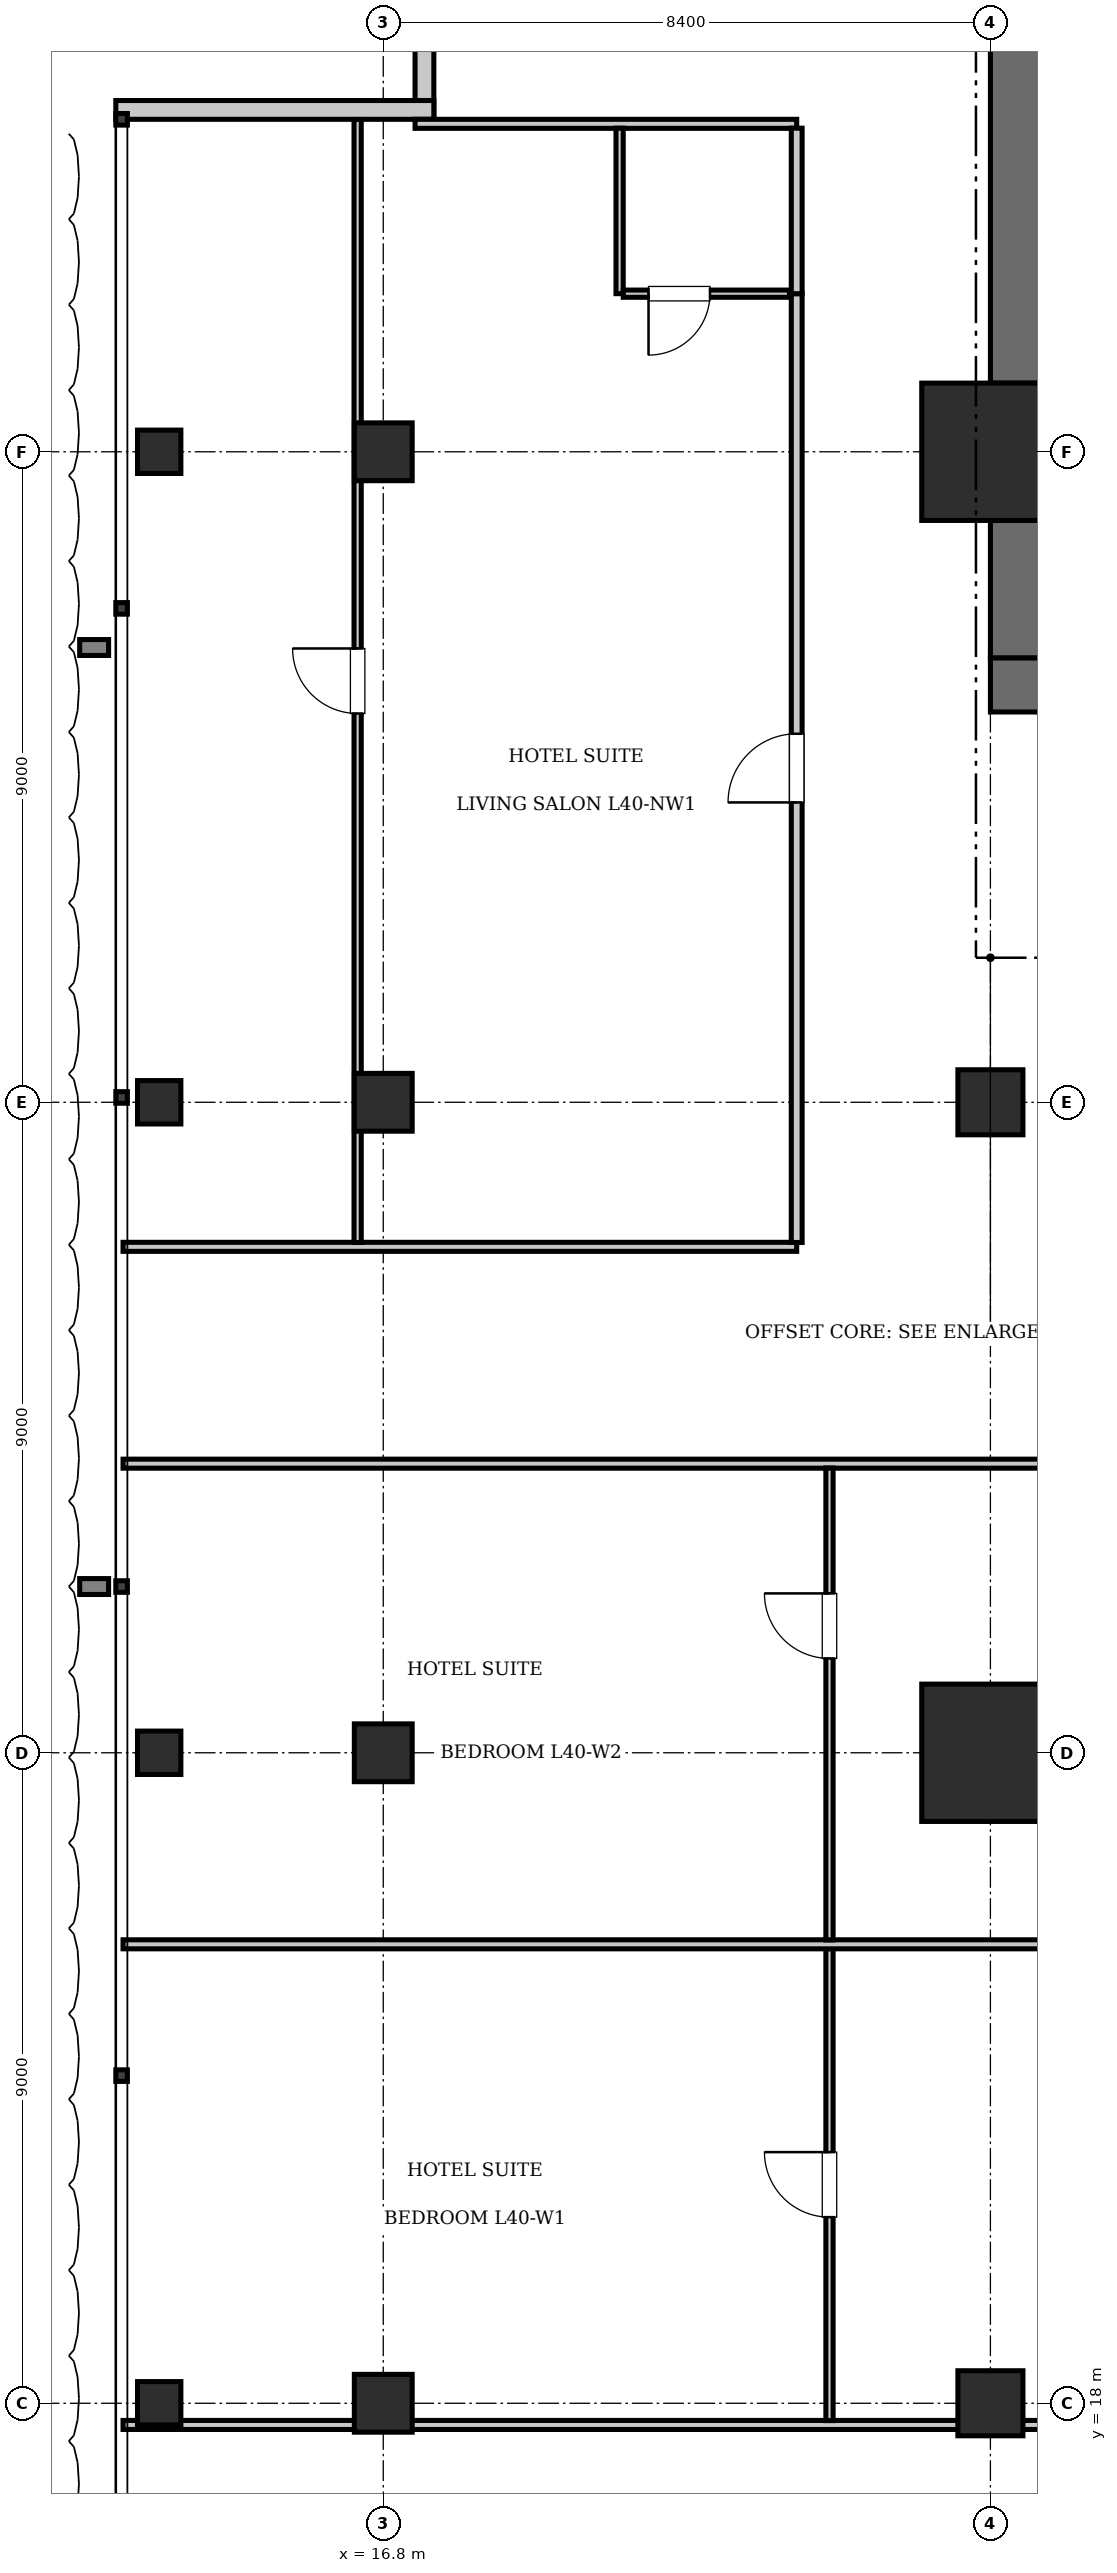
"""IFC4 building model, lengths in metres.
Left out: names, types, materials, properties, quantities, classifications, styles, units other than length and angle.
Written with IfcOpenShell. Run it as: python <this file> out.ifc"""

import sys

from ifc_helpers import new_model, si_unit, direction, frame, frame_2d, origin, origin_2d, place, context, subcontext, project, spatial, rectangle, i_section, extrude, element, fill, save


model = new_model("IFC4")
c1 = context("Model", 3, precision=1e-05, world=origin(), true_north=direction((0.0, 1.0)))
c2 = subcontext(c1, "Body", "Model", "MODEL_VIEW")
j1 = project(units=[si_unit("LENGTHUNIT", "METRE"), si_unit("PLANEANGLEUNIT", "RADIAN")], contexts=[c1])
p1 = place(None, origin())
s1 = spatial("IfcSite", under=j1, at=p1, CompositionType="ELEMENT")
p2 = place(p1, origin())
s2 = spatial("IfcBuilding", under=s1, at=p2, CompositionType="ELEMENT")
p3 = place(p2, frame((0.0, 0.0, 165.9)))
s3 = spatial("IfcBuildingStorey", under=s2, at=p3, CompositionType="ELEMENT", Elevation=165.9)
for number, where, z_axis, x_axis in (
    (1, (25.2, 27.0, 0.0), (0.0, 0.0, 1.0), (1.0, 0.0, 0.0)),
    (2, (25.2, 45.0, 0.0), (0.0, 0.0, 1.0), (1.0, 0.0, 0.0)),
):
    element("IfcColumn", number, at=place(p3, frame(where, z_axis=z_axis, x_axis=x_axis)), inside=s3, PredefinedType="COLUMN", context=c2, shape_type="SweptSolid", body=[
        extrude(rectangle(XDim=1.9, YDim=1.9, at=origin_2d()), origin(), (0.0, 0.0, 1.0), 3.85),
    ])
p4 = place(p3, frame((25.2, 41.775, 0.0), z_axis=(0.0, 0.0, 1.0), x_axis=(1.0, 0.0, 0.0)))
e3 = element("IfcWall", 3, at=p4, inside=s3, PredefinedType="SHEAR", context=c2, shape_type="SweptSolid", body=[
    extrude(rectangle(XDim=6.8, YDim=0.75, at=frame_2d((3.4, 0.0))), origin(), (0.0, 0.0, 1.0), 3.85),
])
p5 = place(p4, frame((1.65, 0.0, 0.0)))
e4 = element("IfcOpeningElement", 4, at=p5, cuts=e3, PredefinedType="OPENING", context=c2, shape_type="SweptSolid", body=[
    extrude(rectangle(XDim=1.15, YDim=2.15, at=frame_2d((0.575, 1.075))), frame((0.0, 0.385, 0.0), z_axis=(0.0, -1.0, 0.0), x_axis=(1.0, 0.0, 0.0)), (0.0, 0.0, 1.0), 0.77),
])
p6 = place(p4, frame((5.15, 0.0, 0.0)))
e5 = element("IfcOpeningElement", 5, at=p6, cuts=e3, PredefinedType="OPENING", context=c2, shape_type="SweptSolid", body=[
    extrude(rectangle(XDim=1.1, YDim=2.2, at=frame_2d((0.55, 1.1))), frame((0.0, 0.385, 0.0), z_axis=(0.0, -1.0, 0.0), x_axis=(1.0, 0.0, 0.0)), (0.0, 0.0, 1.0), 0.77),
])
p7 = place(p3, frame((25.575, 42.15, 0.0), z_axis=(0.0, 0.0, 1.0), x_axis=(0.0, 1.0, 0.0)))
e6 = element("IfcWall", 6, at=p7, inside=s3, PredefinedType="SHEAR", context=c2, shape_type="SweptSolid", body=[
    extrude(rectangle(XDim=1.9, YDim=0.75, at=frame_2d((0.95, 0.0))), origin(), (0.0, 0.0, 1.0), 3.85),
])
p8 = place(p3, frame((25.575, 45.95, 0.0), z_axis=(0.0, 0.0, 1.0), x_axis=(0.0, 1.0, 0.0)))
e7 = element("IfcWall", 7, at=p8, inside=s3, PredefinedType="SHEAR", context=c2, shape_type="SweptSolid", body=[
    extrude(rectangle(XDim=7.3, YDim=0.75, at=frame_2d((3.65, 0.0))), origin(), (0.0, 0.0, 1.0), 3.85),
])
for number, where, z_axis, x_axis in (
    (8, (25.2, 36.0, 0.0), (0.0, 0.0, 1.0), (1.0, 0.0, 0.0)),
    (9, (25.2, 18.0, 0.0), (0.0, 0.0, 1.0), (1.0, 0.0, 0.0)),
):
    element("IfcColumn", number, at=place(p3, frame(where, z_axis=z_axis, x_axis=x_axis)), inside=s3, PredefinedType="COLUMN", context=c2, shape_type="SweptSolid", body=[
        extrude(rectangle(XDim=0.9, YDim=0.9, at=origin_2d()), origin(), (0.0, 0.0, 1.0), 3.85),
    ])
for number, where, z_axis, x_axis in (
    (10, (16.8, 18.0, 0.0), (0.0, 0.0, 1.0), (1.0, 0.0, 0.0)),
    (11, (16.8, 27.0, 0.0), (0.0, 0.0, 1.0), (1.0, 0.0, 0.0)),
    (12, (16.8, 36.0, 0.0), (0.0, 0.0, 1.0), (1.0, 0.0, 0.0)),
    (13, (16.8, 45.0, 0.0), (0.0, 0.0, 1.0), (1.0, 0.0, 0.0)),
):
    element("IfcColumn", number, at=place(p3, frame(where, z_axis=z_axis, x_axis=x_axis)), inside=s3, PredefinedType="COLUMN", context=c2, shape_type="SweptSolid", body=[
        extrude(rectangle(XDim=0.8, YDim=0.8, at=origin_2d()), origin(), (0.0, 0.0, 1.0), 3.85),
    ])
for number, where, z_axis, x_axis in (
    (14, (13.7, 18.0, 0.0), (0.0, 0.0, 1.0), (1.0, 0.0, 0.0)),
    (15, (13.7, 27.0, 0.0), (0.0, 0.0, 1.0), (1.0, 0.0, 0.0)),
    (16, (13.7, 36.0, 0.0), (0.0, 0.0, 1.0), (1.0, 0.0, 0.0)),
    (17, (13.7, 45.0, 0.0), (0.0, 0.0, 1.0), (1.0, 0.0, 0.0)),
):
    element("IfcColumn", number, at=place(p3, frame(where, z_axis=z_axis, x_axis=x_axis)), inside=s3, PredefinedType="COLUMN", context=c2, shape_type="SweptSolid", body=[
        extrude(i_section(OverallWidth=0.6, OverallDepth=0.6, WebThickness=0.025, FlangeThickness=0.038, at=origin_2d()), origin(), (0.0, 0.0, 1.0), 3.85),
    ])
for number, where, z_axis, x_axis in (
    (18, (17.37, 49.6, 0.0), (0.0, 0.0, 1.0), (0.0, 1.0, 0.0)),
    (19, (13.1, 49.73, 0.0), (0.0, 0.0, 1.0), (1.0, 0.0, 0.0)),
):
    element("IfcWall", number, at=place(p3, frame(where, z_axis=z_axis, x_axis=x_axis)), inside=s3, PredefinedType="SOLIDWALL", context=c2, shape_type="SweptSolid", body=[
        extrude(rectangle(XDim=4.4, YDim=0.26, at=frame_2d((2.2, 0.0))), origin(), (0.0, 0.0, 1.0), 3.61),
    ])
for number, where, z_axis, x_axis in (
    (20, (13.2, 17.7, 0.0), (0.0, 0.0, 1.0), (1.0, 0.0, 0.0)),
    (21, (13.2, 31.0, 0.0), (0.0, 0.0, 1.0), (1.0, 0.0, 0.0)),
):
    element("IfcWall", number, at=place(p3, frame(where, z_axis=z_axis, x_axis=x_axis)), inside=s3, PredefinedType="PARTITIONING", context=c2, shape_type="SweptSolid", body=[
        extrude(rectangle(XDim=22.92, YDim=0.125, at=frame_2d((11.46, 0.0))), origin(), (0.0, 0.0, 1.0), 3.61),
    ])
p9 = place(p3, frame((22.974, 17.76, 0.0), z_axis=(0.0, 0.0, 1.0), x_axis=(0.0, 1.0, 0.0)))
e22 = element("IfcWall", 22, at=p9, inside=s3, PredefinedType="PARTITIONING", context=c2, shape_type="SweptSolid", body=[
    extrude(rectangle(XDim=6.53, YDim=0.1, at=frame_2d((3.265, 0.0))), origin(), (0.0, 0.0, 1.0), 3.61),
])
p10 = place(p9, frame((2.815, 0.0, 0.0)))
e23 = element("IfcOpeningElement", 23, at=p10, cuts=e22, PredefinedType="OPENING", context=c2, shape_type="SweptSolid", body=[
    extrude(rectangle(XDim=0.9, YDim=2.1, at=frame_2d((0.45, 1.05))), frame((0.0, 0.06, 0.0), z_axis=(0.0, -1.0, 0.0), x_axis=(1.0, 0.0, 0.0)), (0.0, 0.0, 1.0), 0.12),
])
p11 = place(p3, frame((13.2, 24.35, 0.0), z_axis=(0.0, 0.0, 1.0), x_axis=(1.0, 0.0, 0.0)))
e24 = element("IfcWall", 24, at=p11, inside=s3, PredefinedType="PARTITIONING", context=c2, shape_type="SweptSolid", body=[
    extrude(rectangle(XDim=22.92, YDim=0.125, at=frame_2d((11.46, 0.0))), origin(), (0.0, 0.0, 1.0), 3.61),
])
p12 = place(p3, frame((22.974, 24.41, 0.0), z_axis=(0.0, 0.0, 1.0), x_axis=(0.0, 1.0, 0.0)))
e25 = element("IfcWall", 25, at=p12, inside=s3, PredefinedType="PARTITIONING", context=c2, shape_type="SweptSolid", body=[
    extrude(rectangle(XDim=6.53, YDim=0.1, at=frame_2d((3.265, 0.0))), origin(), (0.0, 0.0, 1.0), 3.61),
])
p13 = place(p12, frame((3.895, 0.0, 0.0)))
e26 = element("IfcOpeningElement", 26, at=p13, cuts=e25, PredefinedType="OPENING", context=c2, shape_type="SweptSolid", body=[
    extrude(rectangle(XDim=0.9, YDim=2.1, at=frame_2d((0.45, 1.05))), frame((0.0, 0.06, 0.0), z_axis=(0.0, -1.0, 0.0), x_axis=(1.0, 0.0, 0.0)), (0.0, 0.0, 1.0), 0.12),
])
p14 = place(p3, frame((13.2, 34.0, 0.0), z_axis=(0.0, 0.0, 1.0), x_axis=(1.0, 0.0, 0.0)))
e27 = element("IfcWall", 27, at=p14, inside=s3, PredefinedType="PARTITIONING", context=c2, shape_type="SweptSolid", body=[
    extrude(rectangle(XDim=9.32, YDim=0.125, at=frame_2d((4.66, 0.0))), origin(), (0.0, 0.0, 1.0), 3.61),
])
p15 = place(p3, frame((17.24, 49.538, 0.0), z_axis=(0.0, 0.0, 1.0), x_axis=(1.0, 0.0, 0.0)))
e28 = element("IfcWall", 28, at=p15, inside=s3, PredefinedType="PARTITIONING", context=c2, shape_type="SweptSolid", body=[
    extrude(rectangle(XDim=5.28, YDim=0.125, at=frame_2d((2.64, 0.0))), origin(), (0.0, 0.0, 1.0), 3.61),
])
p16 = place(p3, frame((22.52, 34.06, 0.0), z_axis=(0.0, 0.0, 1.0), x_axis=(0.0, 1.0, 0.0)))
e29 = element("IfcWall", 29, at=p16, inside=s3, PredefinedType="PARTITIONING", context=c2, shape_type="SweptSolid", body=[
    extrude(rectangle(XDim=13.127, YDim=0.15, at=frame_2d((6.564, 0.0))), origin(), (0.0, 0.0, 1.0), 3.61),
])
p17 = place(p16, frame((6.089, 0.0, 0.0)))
e30 = element("IfcOpeningElement", 30, at=p17, cuts=e29, PredefinedType="OPENING", context=c2, shape_type="SweptSolid", body=[
    extrude(rectangle(XDim=0.95, YDim=2.15, at=frame_2d((0.475, 1.075))), frame((0.0, 0.085, 0.0), z_axis=(0.0, -1.0, 0.0), x_axis=(1.0, 0.0, 0.0)), (0.0, 0.0, 1.0), 0.17),
])
p18 = place(p3, frame((22.52, 47.188, 0.0), z_axis=(0.0, 0.0, 1.0), x_axis=(0.0, 1.0, 0.0)))
e31 = element("IfcWall", 31, at=p18, inside=s3, PredefinedType="PARTITIONING", context=c2, shape_type="SweptSolid", body=[
    extrude(rectangle(XDim=2.29, YDim=0.15, at=frame_2d((1.145, 0.0))), origin(), (0.0, 0.0, 1.0), 3.61),
])
p19 = place(p3, frame((20.07, 47.188, 0.0), z_axis=(0.0, 0.0, 1.0), x_axis=(0.0, 1.0, 0.0)))
e32 = element("IfcWall", 32, at=p19, inside=s3, PredefinedType="PARTITIONING", context=c2, shape_type="SweptSolid", body=[
    extrude(rectangle(XDim=2.29, YDim=0.1, at=frame_2d((1.145, 0.0))), origin(), (0.0, 0.0, 1.0), 3.61),
])
p20 = place(p3, frame((20.12, 47.188, 0.0), z_axis=(0.0, 0.0, 1.0), x_axis=(1.0, 0.0, 0.0)))
e33 = element("IfcWall", 33, at=p20, inside=s3, PredefinedType="PARTITIONING", context=c2, shape_type="SweptSolid", body=[
    extrude(rectangle(XDim=2.3, YDim=0.1, at=frame_2d((1.15, 0.0))), origin(), (0.0, 0.0, 1.0), 3.61),
])
p21 = place(p20, frame((0.35, 0.0, 0.0)))
e34 = element("IfcOpeningElement", 34, at=p21, cuts=e33, PredefinedType="OPENING", context=c2, shape_type="SweptSolid", body=[
    extrude(rectangle(XDim=0.85, YDim=2.1, at=frame_2d((0.425, 1.05))), frame((0.0, 0.06, 0.0), z_axis=(0.0, -1.0, 0.0), x_axis=(1.0, 0.0, 0.0)), (0.0, 0.0, 1.0), 0.12),
])
p22 = place(p3, frame((16.446, 34.06, 0.0), z_axis=(0.0, 0.0, 1.0), x_axis=(0.0, 1.0, 0.0)))
e35 = element("IfcWall", 35, at=p22, inside=s3, PredefinedType="PARTITIONING", context=c2, shape_type="SweptSolid", body=[
    extrude(rectangle(XDim=15.537, YDim=0.1, at=frame_2d((7.769, 0.0))), origin(), (0.0, 0.0, 1.0), 3.61),
])
p23 = place(p22, frame((7.319, 0.0, 0.0)))
e36 = element("IfcOpeningElement", 36, at=p23, cuts=e35, PredefinedType="OPENING", context=c2, shape_type="SweptSolid", body=[
    extrude(rectangle(XDim=0.9, YDim=2.1, at=frame_2d((0.45, 1.05))), frame((0.0, 0.06, 0.0), z_axis=(0.0, -1.0, 0.0), x_axis=(1.0, 0.0, 0.0)), (0.0, 0.0, 1.0), 0.12),
])
p24 = place(p10, origin())
e37 = element("IfcDoor", 37, at=p24, inside=s3, OperationType="SINGLE_SWING_RIGHT", PredefinedType="DOOR", context=c2, shape_type="SweptSolid", body=[
    extrude(rectangle(XDim=0.9, YDim=2.1, at=frame_2d((0.45, 1.05))), frame((0.0, 0.025, 0.0), z_axis=(0.0, -1.0, 0.0), x_axis=(1.0, 0.0, 0.0)), (0.0, 0.0, 1.0), 0.05),
])
fill(e23, e37)
p25 = place(p13, origin())
e38 = element("IfcDoor", 38, at=p25, inside=s3, OperationType="SINGLE_SWING_RIGHT", PredefinedType="DOOR", context=c2, shape_type="SweptSolid", body=[
    extrude(rectangle(XDim=0.9, YDim=2.1, at=frame_2d((0.45, 1.05))), frame((0.0, 0.025, 0.0), z_axis=(0.0, -1.0, 0.0), x_axis=(1.0, 0.0, 0.0)), (0.0, 0.0, 1.0), 0.05),
])
fill(e26, e38)
p26 = place(p21, frame((0.85, 0.0, 0.0), z_axis=(0.0, 0.0, 1.0), x_axis=(-1.0, 0.0, 0.0)))
e39 = element("IfcDoor", 39, at=p26, inside=s3, OperationType="SINGLE_SWING_RIGHT", PredefinedType="DOOR", context=c2, shape_type="SweptSolid", body=[
    extrude(rectangle(XDim=0.85, YDim=2.1, at=frame_2d((0.425, 1.05))), frame((0.0, 0.025, 0.0), z_axis=(0.0, -1.0, 0.0), x_axis=(1.0, 0.0, 0.0)), (0.0, 0.0, 1.0), 0.05),
])
fill(e34, e39)
p27 = place(p17, origin())
e40 = element("IfcDoor", 40, at=p27, inside=s3, OperationType="SINGLE_SWING_LEFT", PredefinedType="DOOR", context=c2, shape_type="SweptSolid", body=[
    extrude(rectangle(XDim=0.95, YDim=2.15, at=frame_2d((0.475, 1.075))), frame((0.0, 0.025, 0.0), z_axis=(0.0, -1.0, 0.0), x_axis=(1.0, 0.0, 0.0)), (0.0, 0.0, 1.0), 0.05),
])
fill(e30, e40)
p28 = place(p23, origin())
e41 = element("IfcDoor", 41, at=p28, inside=s3, OperationType="SINGLE_SWING_RIGHT", PredefinedType="DOOR", context=c2, shape_type="SweptSolid", body=[
    extrude(rectangle(XDim=0.9, YDim=2.1, at=frame_2d((0.45, 1.05))), frame((0.0, 0.025, 0.0), z_axis=(0.0, -1.0, 0.0), x_axis=(1.0, 0.0, 0.0)), (0.0, 0.0, 1.0), 0.05),
])
fill(e36, e41)
save(model, sys.argv[1])
